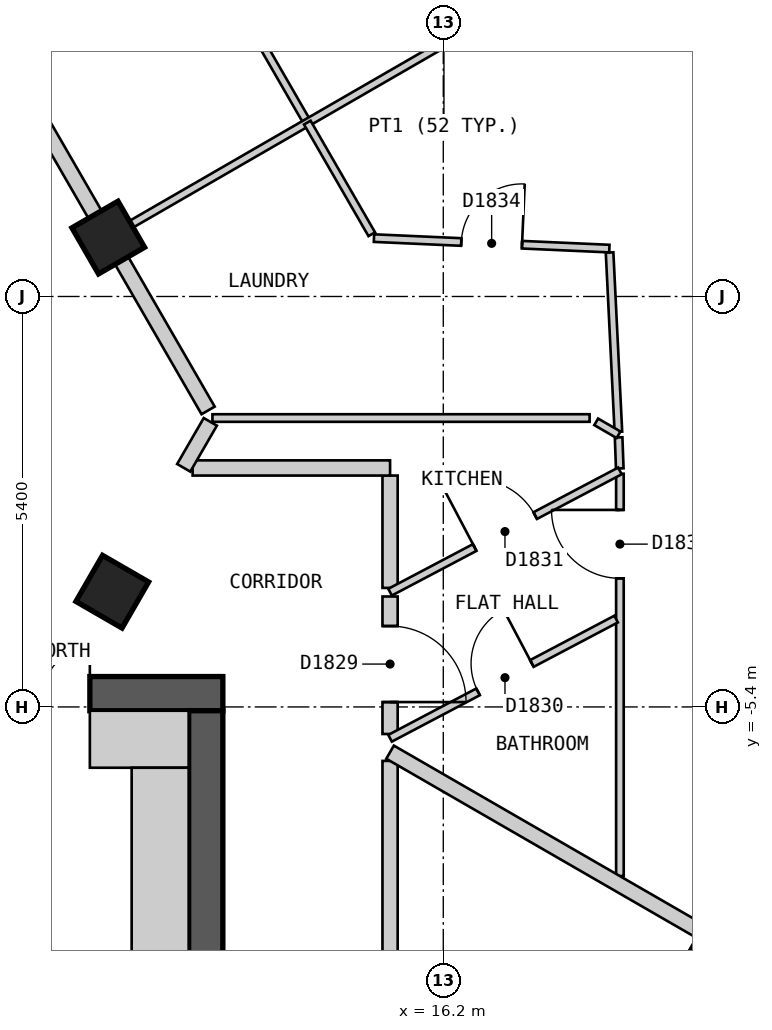
"""IFC4 building model, lengths in metres.
Left out: names, types, materials, properties, quantities, classifications, styles, units other than length and angle.
Written with IfcOpenShell. Run it as: python <this file> out.ifc"""

import sys

from ifc_helpers import new_model, si_unit, direction, frame, frame_2d, origin, origin_2d, place, context, subcontext, project, spatial, polyline, rectangle, outline, extrude, element, fill, save


model = new_model("IFC4")
c1 = context("Model", 3, precision=1e-05, world=origin(), true_north=direction((0.0, 1.0)))
c2 = subcontext(c1, "Body", "Model", "MODEL_VIEW")
j1 = project(units=[si_unit("LENGTHUNIT", "METRE"), si_unit("PLANEANGLEUNIT", "RADIAN")], contexts=[c1])
p1 = place(None, origin())
s1 = spatial("IfcSite", under=j1, at=p1, CompositionType="ELEMENT")
p2 = place(p1, origin())
s2 = spatial("IfcBuilding", under=s1, at=p2, CompositionType="ELEMENT")
p3 = place(p2, frame((0.0, 0.0, 208.8)))
s3 = spatial("IfcBuildingStorey", under=s2, at=p3, CompositionType="ELEMENT", Elevation=208.8)
for number, where, z_axis, x_axis in (
    (1, (19.899, -8.534, 0.0), (0.0, 0.0, 1.0), (0.5, 0.866, 0.0)),
    (2, (11.845, -3.884, 0.0), (0.0, 0.0, 1.0), (0.5, 0.866, 0.0)),
    (3, (11.792, 0.775, 0.0), (0.0, 0.0, 1.0), (-0.5, 0.866, 0.0)),
):
    element("IfcColumn", number, at=place(p3, frame(where, z_axis=z_axis, x_axis=x_axis)), inside=s3, PredefinedType="COLUMN", context=c2, shape_type="SweptSolid", body=[
        extrude(rectangle(XDim=0.7, YDim=0.7, at=origin_2d()), origin(), (0.0, 0.0, 1.0), 3.0),
    ])
p4 = place(p3, frame((-13.3, -5.225, 0.0), z_axis=(0.0, 0.0, 1.0), x_axis=(1.0, 0.0, 0.0)))
e4 = element("IfcWall", 4, at=p4, inside=s3, PredefinedType="SHEAR", context=c2, shape_type="SweptSolid", body=[
    extrude(rectangle(XDim=26.6, YDim=0.45, at=frame_2d((13.3, 0.0))), origin(), (0.0, 0.0, 1.0), 2.7),
])
p5 = place(p4, frame((23.65, 0.0, 0.0)))
e5 = element("IfcOpeningElement", 5, at=p5, cuts=e4, PredefinedType="OPENING", context=c2, shape_type="SweptSolid", body=[
    extrude(rectangle(XDim=1.2, YDim=2.1, at=frame_2d((0.6, 1.05))), frame((0.0, 0.235, 0.0), z_axis=(0.0, -1.0, 0.0), x_axis=(1.0, 0.0, 0.0)), (0.0, 0.0, 1.0), 0.47),
])
p6 = place(p3, frame((13.075, -18.55, 0.0), z_axis=(0.0, 0.0, 1.0), x_axis=(0.0, 1.0, 0.0)))
e6 = element("IfcWall", 6, at=p6, inside=s3, PredefinedType="SHEAR", context=c2, shape_type="SweptSolid", body=[
    extrude(rectangle(XDim=13.1, YDim=0.45, at=frame_2d((6.55, 0.0))), origin(), (0.0, 0.0, 1.0), 2.7),
])
p7 = place(p3, frame((15.285, -18.425, 0.0), z_axis=(0.0, 0.0, 1.0), x_axis=(0.500012653391, 0.866018098222, 0.0)))
e7 = element("IfcWall", 7, at=p7, inside=s3, PredefinedType="SOLIDWALL", context=c2, shape_type="SweptSolid", body=[
    extrude(outline(polyline([(0.0, -0.15), (16.628, -0.15), (16.548, 0.15), (0.08, 0.15), (0.0, -0.15)])), origin(), (0.0, 0.0, 1.0), 2.7),
])
p8 = place(p7, frame((1.165, 0.0, 0.15)))
e8 = element("IfcOpeningElement", 8, at=p8, cuts=e7, PredefinedType="OPENING", context=c2, shape_type="SweptSolid", body=[
    extrude(rectangle(XDim=1.5, YDim=2.1, at=frame_2d((0.75, 1.05))), frame((0.0, 0.16, 0.0), z_axis=(0.0, -1.0, 0.0), x_axis=(1.0, 0.0, 0.0)), (0.0, 0.0, 1.0), 0.32),
])
p9 = place(p7, frame((3.724, 0.0, 0.15)))
e9 = element("IfcOpeningElement", 9, at=p9, cuts=e7, PredefinedType="OPENING", context=c2, shape_type="SweptSolid", body=[
    extrude(rectangle(XDim=1.5, YDim=2.1, at=frame_2d((0.75, 1.05))), frame((0.0, 0.16, 0.0), z_axis=(0.0, -1.0, 0.0), x_axis=(1.0, 0.0, 0.0)), (0.0, 0.0, 1.0), 0.32),
])
p10 = place(p7, frame((6.283, 0.0, 0.15)))
e10 = element("IfcOpeningElement", 10, at=p10, cuts=e7, PredefinedType="OPENING", context=c2, shape_type="SweptSolid", body=[
    extrude(rectangle(XDim=1.5, YDim=2.1, at=frame_2d((0.75, 1.05))), frame((0.0, 0.16, 0.0), z_axis=(0.0, -1.0, 0.0), x_axis=(1.0, 0.0, 0.0)), (0.0, 0.0, 1.0), 0.32),
])
p11 = place(p7, frame((8.843, 0.0, 0.15)))
e11 = element("IfcOpeningElement", 11, at=p11, cuts=e7, PredefinedType="OPENING", context=c2, shape_type="SweptSolid", body=[
    extrude(rectangle(XDim=1.5, YDim=2.1, at=frame_2d((0.75, 1.05))), frame((0.0, 0.16, 0.0), z_axis=(0.0, -1.0, 0.0), x_axis=(1.0, 0.0, 0.0)), (0.0, 0.0, 1.0), 0.32),
])
p12 = place(p7, frame((11.402, 0.0, 0.15)))
e12 = element("IfcOpeningElement", 12, at=p12, cuts=e7, PredefinedType="OPENING", context=c2, shape_type="SweptSolid", body=[
    extrude(rectangle(XDim=1.5, YDim=2.1, at=frame_2d((0.75, 1.05))), frame((0.0, 0.16, 0.0), z_axis=(0.0, -1.0, 0.0), x_axis=(1.0, 0.0, 0.0)), (0.0, 0.0, 1.0), 0.32),
])
p13 = place(p7, frame((13.962, 0.0, 0.15)))
e13 = element("IfcOpeningElement", 13, at=p13, cuts=e7, PredefinedType="OPENING", context=c2, shape_type="SweptSolid", body=[
    extrude(rectangle(XDim=1.5, YDim=2.1, at=frame_2d((0.75, 1.05))), frame((0.0, 0.16, 0.0), z_axis=(0.0, -1.0, 0.0), x_axis=(1.0, 0.0, 0.0)), (0.0, 0.0, 1.0), 0.32),
])
p14 = place(p3, frame((23.599, 0.825, 0.0), z_axis=(0.0, 0.0, 1.0), x_axis=(-0.500003656944, 0.866023292436, 0.0)))
e14 = element("IfcWall", 14, at=p14, inside=s3, PredefinedType="SOLIDWALL", context=c2, shape_type="SweptSolid", body=[
    extrude(outline(polyline([(0.0, -0.15), (22.17, -0.15), (22.09, 0.15), (0.08, 0.15), (0.0, -0.15)])), origin(), (0.0, 0.0, 1.0), 2.7),
])
p15 = place(p14, frame((1.191, 0.0, 0.15)))
e15 = element("IfcOpeningElement", 15, at=p15, cuts=e14, PredefinedType="OPENING", context=c2, shape_type="SweptSolid", body=[
    extrude(rectangle(XDim=1.5, YDim=2.1, at=frame_2d((0.75, 1.05))), frame((0.0, 0.16, 0.0), z_axis=(0.0, -1.0, 0.0), x_axis=(1.0, 0.0, 0.0)), (0.0, 0.0, 1.0), 0.32),
])
p16 = place(p14, frame((3.804, 0.0, 0.15)))
e16 = element("IfcOpeningElement", 16, at=p16, cuts=e14, PredefinedType="OPENING", context=c2, shape_type="SweptSolid", body=[
    extrude(rectangle(XDim=1.5, YDim=2.1, at=frame_2d((0.75, 1.05))), frame((0.0, 0.16, 0.0), z_axis=(0.0, -1.0, 0.0), x_axis=(1.0, 0.0, 0.0)), (0.0, 0.0, 1.0), 0.32),
])
p17 = place(p14, frame((6.417, 0.0, 0.15)))
e17 = element("IfcOpeningElement", 17, at=p17, cuts=e14, PredefinedType="OPENING", context=c2, shape_type="SweptSolid", body=[
    extrude(rectangle(XDim=1.5, YDim=2.1, at=frame_2d((0.75, 1.05))), frame((0.0, 0.16, 0.0), z_axis=(0.0, -1.0, 0.0), x_axis=(1.0, 0.0, 0.0)), (0.0, 0.0, 1.0), 0.32),
])
p18 = place(p14, frame((9.029, 0.0, 0.15)))
e18 = element("IfcOpeningElement", 18, at=p18, cuts=e14, PredefinedType="OPENING", context=c2, shape_type="SweptSolid", body=[
    extrude(rectangle(XDim=1.5, YDim=2.1, at=frame_2d((0.75, 1.05))), frame((0.0, 0.16, 0.0), z_axis=(0.0, -1.0, 0.0), x_axis=(1.0, 0.0, 0.0)), (0.0, 0.0, 1.0), 0.32),
])
p19 = place(p14, frame((11.641, 0.0, 0.15)))
e19 = element("IfcOpeningElement", 19, at=p19, cuts=e14, PredefinedType="OPENING", context=c2, shape_type="SweptSolid", body=[
    extrude(rectangle(XDim=1.5, YDim=2.1, at=frame_2d((0.75, 1.05))), frame((0.0, 0.16, 0.0), z_axis=(0.0, -1.0, 0.0), x_axis=(1.0, 0.0, 0.0)), (0.0, 0.0, 1.0), 0.32),
])
p20 = place(p14, frame((14.254, 0.0, 0.15)))
e20 = element("IfcOpeningElement", 20, at=p20, cuts=e14, PredefinedType="OPENING", context=c2, shape_type="SweptSolid", body=[
    extrude(rectangle(XDim=1.5, YDim=2.1, at=frame_2d((0.75, 1.05))), frame((0.0, 0.16, 0.0), z_axis=(0.0, -1.0, 0.0), x_axis=(1.0, 0.0, 0.0)), (0.0, 0.0, 1.0), 0.32),
])
p21 = place(p14, frame((16.866, 0.0, 0.15)))
e21 = element("IfcOpeningElement", 21, at=p21, cuts=e14, PredefinedType="OPENING", context=c2, shape_type="SweptSolid", body=[
    extrude(rectangle(XDim=1.5, YDim=2.1, at=frame_2d((0.75, 1.05))), frame((0.0, 0.16, 0.0), z_axis=(0.0, -1.0, 0.0), x_axis=(1.0, 0.0, 0.0)), (0.0, 0.0, 1.0), 0.32),
])
p22 = place(p14, frame((19.479, 0.0, 0.15)))
e22 = element("IfcOpeningElement", 22, at=p22, cuts=e14, PredefinedType="OPENING", context=c2, shape_type="SweptSolid", body=[
    extrude(rectangle(XDim=1.5, YDim=2.1, at=frame_2d((0.75, 1.05))), frame((0.0, 0.16, 0.0), z_axis=(0.0, -1.0, 0.0), x_axis=(1.0, 0.0, 0.0)), (0.0, 0.0, 1.0), 0.32),
])
p23 = place(p3, frame((9.238, 5.2, 0.0), z_axis=(0.0, 0.0, 1.0), x_axis=(0.500025705601, -0.86601056214, 0.0)))
e23 = element("IfcWall", 23, at=p23, inside=s3, PredefinedType="PARTITIONING", context=c2, shape_type="SweptSolid", body=[
    extrude(rectangle(XDim=7.735, YDim=0.2, at=frame_2d((3.868, 0.0))), origin(), (0.0, 0.0, 1.0), 2.7),
])
p24 = place(p3, frame((15.5, -2.356, 0.0), z_axis=(0.0, 0.0, 1.0), x_axis=(0.0, -1.0, 0.0)))
e24 = element("IfcWall", 24, at=p24, inside=s3, PredefinedType="PARTITIONING", context=c2, shape_type="SweptSolid", body=[
    extrude(rectangle(XDim=1.478, YDim=0.2, at=frame_2d((0.739, 0.0))), origin(), (0.0, 0.0, 1.0), 2.7),
])
p25 = place(p3, frame((15.5, -6.11, 0.0), z_axis=(0.0, 0.0, 1.0), x_axis=(0.0, -1.0, 0.0)))
e25 = element("IfcWall", 25, at=p25, inside=s3, PredefinedType="PARTITIONING", context=c2, shape_type="SweptSolid", body=[
    extrude(rectangle(XDim=4.74, YDim=0.2, at=frame_2d((2.37, 0.0))), origin(), (0.0, 0.0, 1.0), 2.7),
])
p26 = place(p3, frame((12.902, -2.256, 0.0), z_axis=(0.0, 0.0, 1.0), x_axis=(1.0, 0.0, 0.0)))
e26 = element("IfcWall", 26, at=p26, inside=s3, PredefinedType="PARTITIONING", context=c2, shape_type="SweptSolid", body=[
    extrude(rectangle(XDim=2.598, YDim=0.2, at=frame_2d((1.299, 0.0))), origin(), (0.0, 0.0, 1.0), 2.7),
])
p27 = place(p3, frame((12.785, -2.254, 0.0), z_axis=(0.0, 0.0, 1.0), x_axis=(0.500871040665, 0.865521923826, 0.0)))
e27 = element("IfcWall", 27, at=p27, inside=s3, PredefinedType="PARTITIONING", context=c2, shape_type="SweptSolid", body=[
    extrude(rectangle(XDim=0.699, YDim=0.2, at=frame_2d((0.35, 0.0))), origin(), (0.0, 0.0, 1.0), 2.7),
])
p28 = place(p3, frame((15.5, -5.756, 0.0), z_axis=(0.0, 0.0, 1.0), x_axis=(0.0, 1.0, 0.0)))
e28 = element("IfcWall", 28, at=p28, inside=s3, PredefinedType="PARTITIONING", context=c2, shape_type="SweptSolid", body=[
    extrude(rectangle(XDim=1.809, YDim=0.2, at=frame_2d((0.905, 0.0))), origin(), (0.0, 0.0, 1.0), 2.7),
])
p29 = place(p28, frame((0.42, 0.0, 0.0)))
e29 = element("IfcOpeningElement", 29, at=p29, cuts=e28, PredefinedType="OPENING", context=c2, shape_type="SweptSolid", body=[
    extrude(rectangle(XDim=1.0, YDim=2.1, at=frame_2d((0.5, 1.05))), frame((0.0, 0.11, 0.0), z_axis=(0.0, -1.0, 0.0), x_axis=(1.0, 0.0, 0.0)), (0.0, 0.0, 1.0), 0.22),
])
p30 = place(p3, frame((12.759, 5.15, 0.0), z_axis=(0.0, 0.0, 1.0), x_axis=(0.499905801698, -0.866079782369, 0.0)))
e30 = element("IfcWall", 30, at=p30, inside=s3, PredefinedType="PARTITIONING", context=c2, shape_type="SweptSolid", body=[
    extrude(rectangle(XDim=3.304, YDim=0.1, at=frame_2d((1.652, 0.0))), origin(), (0.0, 0.0, 1.0), 2.7),
])
p31 = place(p30, frame((1.223, 0.0, 0.0)))
e31 = element("IfcOpeningElement", 31, at=p31, cuts=e30, PredefinedType="OPENING", context=c2, shape_type="SweptSolid", body=[
    extrude(rectangle(XDim=0.8, YDim=2.1, at=frame_2d((0.4, 1.05))), frame((0.0, 0.06, 0.0), z_axis=(0.0, -1.0, 0.0), x_axis=(1.0, 0.0, 0.0)), (0.0, 0.0, 1.0), 0.12),
])
p32 = place(p3, frame((18.388, 0.579, 0.0), z_axis=(0.0, 0.0, 1.0), x_axis=(0.049097293833, -0.998794000652, 0.0)))
e32 = element("IfcWall", 32, at=p32, inside=s3, PredefinedType="PARTITIONING", context=c2, shape_type="SweptSolid", body=[
    extrude(rectangle(XDim=2.362, YDim=0.1, at=frame_2d((1.181, 0.0))), origin(), (0.0, 0.0, 1.0), 2.7),
])
p33 = place(p3, frame((18.507, -1.854, 0.0), z_axis=(0.0, 0.0, 1.0), x_axis=(0.036480787329, -0.999334354536, 0.0)))
e33 = element("IfcWall", 33, at=p33, inside=s3, PredefinedType="PARTITIONING", context=c2, shape_type="SweptSolid", body=[
    extrude(rectangle(XDim=0.408, YDim=0.1, at=frame_2d((0.204, 0.0))), origin(), (0.0, 0.0, 1.0), 2.7),
])
p34 = place(p3, frame((15.288, 0.768, 0.0), z_axis=(0.0, 0.0, 1.0), x_axis=(0.999006028269, -0.044575278833, 0.0)))
e34 = element("IfcWall", 34, at=p34, inside=s3, PredefinedType="PARTITIONING", context=c2, shape_type="SweptSolid", body=[
    extrude(rectangle(XDim=3.1, YDim=0.1, at=frame_2d((1.55, 0.0))), origin(), (0.0, 0.0, 1.0), 2.7),
])
p35 = place(p34, frame((1.15, 0.0, 0.0)))
e35 = element("IfcOpeningElement", 35, at=p35, cuts=e34, PredefinedType="OPENING", context=c2, shape_type="SweptSolid", body=[
    extrude(rectangle(XDim=0.8, YDim=2.1, at=frame_2d((0.4, 1.05))), frame((0.0, 0.06, 0.0), z_axis=(0.0, -1.0, 0.0), x_axis=(1.0, 0.0, 0.0)), (0.0, 0.0, 1.0), 0.12),
])
p36 = place(p3, frame((18.212, -1.649, 0.0), z_axis=(0.0, 0.0, 1.0), x_axis=(0.865622947871, -0.500696427109, 0.0)))
e36 = element("IfcWall", 36, at=p36, inside=s3, PredefinedType="PARTITIONING", context=c2, shape_type="SweptSolid", body=[
    extrude(rectangle(XDim=0.34, YDim=0.1, at=frame_2d((0.17, 0.0))), origin(), (0.0, 0.0, 1.0), 2.7),
])
p37 = place(p3, frame((13.163, -1.599, 0.0), z_axis=(0.0, 0.0, 1.0), x_axis=(1.0, 0.0, 0.0)))
e37 = element("IfcWall", 37, at=p37, inside=s3, PredefinedType="PARTITIONING", context=c2, shape_type="SweptSolid", body=[
    extrude(rectangle(XDim=4.962, YDim=0.1, at=frame_2d((2.481, 0.0))), origin(), (0.0, 0.0, 1.0), 2.7),
])
p38 = place(p3, frame((18.524, -7.625, 0.0), z_axis=(0.0, 0.0, 1.0), x_axis=(0.0, 1.0, 0.0)))
e38 = element("IfcWall", 38, at=p38, inside=s3, PredefinedType="PARTITIONING", context=c2, shape_type="SweptSolid", body=[
    extrude(rectangle(XDim=5.293, YDim=0.1, at=frame_2d((2.646, 0.0))), origin(), (0.0, 0.0, 1.0), 2.7),
])
p39 = place(p38, frame((3.917, 0.0, 0.0)))
e39 = element("IfcOpeningElement", 39, at=p39, cuts=e38, PredefinedType="OPENING", context=c2, shape_type="SweptSolid", body=[
    extrude(rectangle(XDim=0.9, YDim=2.1, at=frame_2d((0.45, 1.05))), frame((0.0, 0.06, 0.0), z_axis=(0.0, -1.0, 0.0), x_axis=(1.0, 0.0, 0.0)), (0.0, 0.0, 1.0), 0.12),
])
p40 = place(p3, frame((15.5, -3.89, 0.0), z_axis=(0.0, 0.0, 1.0), x_axis=(0.884504274727, 0.466532086775, 0.0)))
e40 = element("IfcWall", 40, at=p40, inside=s3, PredefinedType="PARTITIONING", context=c2, shape_type="SweptSolid", body=[
    extrude(rectangle(XDim=3.419, YDim=0.1, at=frame_2d((1.709, 0.0))), origin(), (0.0, 0.0, 1.0), 2.7),
])
p41 = place(p40, frame((1.259, 0.0, 0.0)))
e41 = element("IfcOpeningElement", 41, at=p41, cuts=e40, PredefinedType="OPENING", context=c2, shape_type="SweptSolid", body=[
    extrude(rectangle(XDim=0.9, YDim=2.1, at=frame_2d((0.45, 1.05))), frame((0.0, 0.06, 0.0), z_axis=(0.0, -1.0, 0.0), x_axis=(1.0, 0.0, 0.0)), (0.0, 0.0, 1.0), 0.12),
])
p42 = place(p3, frame((15.5, -5.812, 0.0), z_axis=(0.0, 0.0, 1.0), x_axis=(0.884576181409, 0.46639573249, 0.0)))
e42 = element("IfcWall", 42, at=p42, inside=s3, PredefinedType="PARTITIONING", context=c2, shape_type="SweptSolid", body=[
    extrude(rectangle(XDim=3.362, YDim=0.1, at=frame_2d((1.681, 0.0))), origin(), (0.0, 0.0, 1.0), 2.7),
])
p43 = place(p42, frame((1.309, 0.0, 0.0)))
e43 = element("IfcOpeningElement", 43, at=p43, cuts=e42, PredefinedType="OPENING", context=c2, shape_type="SweptSolid", body=[
    extrude(rectangle(XDim=0.8, YDim=2.1, at=frame_2d((0.4, 1.05))), frame((0.0, 0.06, 0.0), z_axis=(0.0, -1.0, 0.0), x_axis=(1.0, 0.0, 0.0)), (0.0, 0.0, 1.0), 0.12),
])
p44 = place(p3, frame((11.879, 0.826, 0.0), z_axis=(0.0, 0.0, 1.0), x_axis=(0.866065245018, 0.499930986609, 0.0)))
e44 = element("IfcWall", 44, at=p44, inside=s3, PredefinedType="PARTITIONING", context=c2, shape_type="SweptSolid", body=[
    extrude(rectangle(XDim=10.0, YDim=0.1, at=frame_2d((5.0, 0.0))), origin(), (0.0, 0.0, 1.0), 2.7),
])
p45 = place(p44, frame((6.012, 0.0, 0.0)))
e45 = element("IfcOpeningElement", 45, at=p45, cuts=e44, PredefinedType="OPENING", context=c2, shape_type="SweptSolid", body=[
    extrude(rectangle(XDim=0.9, YDim=2.1, at=frame_2d((0.45, 1.05))), frame((0.0, 0.06, 0.0), z_axis=(0.0, -1.0, 0.0), x_axis=(1.0, 0.0, 0.0)), (0.0, 0.0, 1.0), 0.12),
])
p46 = place(p3, frame((15.5, -5.995, 0.0), z_axis=(0.0, 0.0, 1.0), x_axis=(0.866052111102, -0.499953738716, 0.0)))
e46 = element("IfcWall", 46, at=p46, inside=s3, PredefinedType="PARTITIONING", context=c2, shape_type="SweptSolid", body=[
    extrude(rectangle(XDim=5.878, YDim=0.2, at=frame_2d((2.939, 0.0))), origin(), (0.0, 0.0, 1.0), 2.7),
])
p47 = place(p3, frame((14.411, 2.288, 0.0), z_axis=(0.0, 0.0, 1.0), x_axis=(0.500009005995, -0.866020204108, 0.0)))
e47 = element("IfcWall", 47, at=p47, inside=s3, PredefinedType="PARTITIONING", context=c2, shape_type="SweptSolid", body=[
    extrude(rectangle(XDim=1.696, YDim=0.1, at=frame_2d((0.848, 0.0))), origin(), (0.0, 0.0, 1.0), 2.7),
])
p48 = place(p3, frame((11.55, -5.825, 0.0), z_axis=(0.0, 0.0, 1.0), x_axis=(1.0, 0.0, 0.0)))
e48 = element("IfcWall", 48, at=p48, inside=s3, PredefinedType="PARTITIONING", context=c2, shape_type="SweptSolid", body=[
    extrude(rectangle(XDim=1.3, YDim=0.75, at=frame_2d((0.65, 0.0))), origin(), (0.0, 0.0, 1.0), 2.7),
])
p49 = place(p3, frame((12.475, -14.45, 0.0), z_axis=(0.0, 0.0, 1.0), x_axis=(0.0, 1.0, 0.0)))
e49 = element("IfcWall", 49, at=p49, inside=s3, PredefinedType="PARTITIONING", context=c2, shape_type="SweptSolid", body=[
    extrude(rectangle(XDim=8.25, YDim=0.75, at=frame_2d((4.125, 0.0))), origin(), (0.0, 0.0, 1.0), 2.7),
])
p50 = place(p29, origin())
e50 = element("IfcDoor", 50, at=p50, inside=s3, OperationType="SINGLE_SWING_LEFT", PredefinedType="DOOR", context=c2, shape_type="SweptSolid", body=[
    extrude(rectangle(XDim=1.0, YDim=2.1, at=frame_2d((0.5, 1.05))), frame((0.0, 0.025, 0.0), z_axis=(0.0, -1.0, 0.0), x_axis=(1.0, 0.0, 0.0)), (0.0, 0.0, 1.0), 0.05),
])
fill(e29, e50)
p51 = place(p43, origin())
e51 = element("IfcDoor", 51, at=p51, inside=s3, OperationType="SINGLE_SWING_RIGHT", PredefinedType="DOOR", context=c2, shape_type="SweptSolid", body=[
    extrude(rectangle(XDim=0.8, YDim=2.1, at=frame_2d((0.4, 1.05))), frame((0.0, 0.025, 0.0), z_axis=(0.0, -1.0, 0.0), x_axis=(1.0, 0.0, 0.0)), (0.0, 0.0, 1.0), 0.05),
])
fill(e43, e51)
p52 = place(p41, origin())
e52 = element("IfcDoor", 52, at=p52, inside=s3, OperationType="SINGLE_SWING_LEFT", PredefinedType="DOOR", context=c2, shape_type="SweptSolid", body=[
    extrude(rectangle(XDim=0.9, YDim=2.1, at=frame_2d((0.45, 1.05))), frame((0.0, 0.025, 0.0), z_axis=(0.0, -1.0, 0.0), x_axis=(1.0, 0.0, 0.0)), (0.0, 0.0, 1.0), 0.05),
])
fill(e41, e52)
p53 = place(p39, origin())
e53 = element("IfcDoor", 53, at=p53, inside=s3, OperationType="SINGLE_SWING_RIGHT", PredefinedType="DOOR", context=c2, shape_type="SweptSolid", body=[
    extrude(rectangle(XDim=0.9, YDim=2.1, at=frame_2d((0.45, 1.05))), frame((0.0, 0.025, 0.0), z_axis=(0.0, -1.0, 0.0), x_axis=(1.0, 0.0, 0.0)), (0.0, 0.0, 1.0), 0.05),
])
fill(e39, e53)
p54 = place(p35, origin())
e54 = element("IfcDoor", 54, at=p54, inside=s3, OperationType="SINGLE_SWING_RIGHT", PredefinedType="DOOR", context=c2, shape_type="SweptSolid", body=[
    extrude(rectangle(XDim=0.8, YDim=2.1, at=frame_2d((0.4, 1.05))), frame((0.0, 0.025, 0.0), z_axis=(0.0, -1.0, 0.0), x_axis=(1.0, 0.0, 0.0)), (0.0, 0.0, 1.0), 0.05),
])
fill(e35, e54)
p55 = place(p5, origin())
e55 = element("IfcDoor", 55, at=p55, inside=s3, OperationType="DOUBLE_DOOR_SINGLE_SWING", PredefinedType="DOOR", context=c2, shape_type="SweptSolid", body=[
    extrude(rectangle(XDim=1.2, YDim=2.1, at=frame_2d((0.6, 1.05))), frame((0.0, 0.025, 0.0), z_axis=(0.0, -1.0, 0.0), x_axis=(1.0, 0.0, 0.0)), (0.0, 0.0, 1.0), 0.05),
])
fill(e5, e55)
save(model, sys.argv[1])
